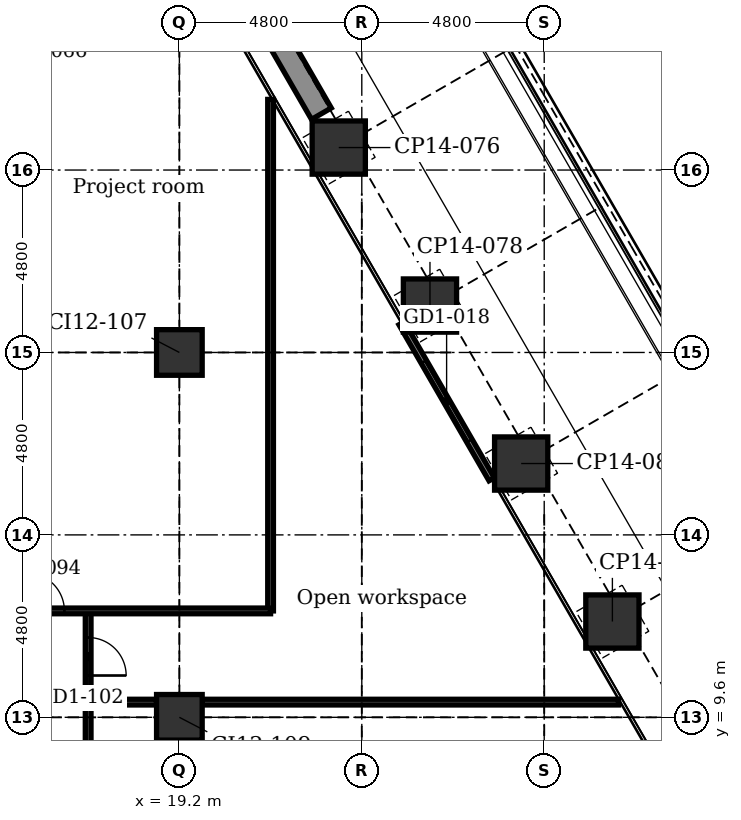
"""IFC4 building model, lengths in metres.
Left out: names, types, materials, properties, quantities, classifications, styles, units other than length and angle.
Written with IfcOpenShell. Run it as: python <this file> out.ifc"""

import sys

from ifc_helpers import new_model, si_unit, direction, frame, frame_2d, origin, origin_2d, place, context, subcontext, project, spatial, rectangle, extrude, element, fill, save


model = new_model("IFC4")
c1 = context("Model", 3, precision=1e-05, world=origin(), true_north=direction((0.0, 1.0)))
c2 = subcontext(c1, "Body", "Model", "MODEL_VIEW")
j1 = project(units=[si_unit("LENGTHUNIT", "METRE"), si_unit("PLANEANGLEUNIT", "RADIAN")], contexts=[c1])
p1 = place(None, origin())
s1 = spatial("IfcSite", under=j1, at=p1, CompositionType="ELEMENT")
p2 = place(p1, origin())
s2 = spatial("IfcBuilding", under=s1, at=p2, CompositionType="ELEMENT")
p3 = place(p2, frame((0.0, 0.0, 38.9)))
s3 = spatial("IfcBuildingStorey", under=s2, at=p3, CompositionType="ELEMENT", Elevation=38.9)
for number, where, z_axis, x_axis in (
    (1, (23.394, 24.592, -0.25), (0.0, 0.0, 1.0), (0.866, 0.5, 0.0)),
    (2, (25.794, 20.435, -0.25), (0.0, 0.0, 1.0), (0.866, 0.5, 0.0)),
    (3, (28.194, 16.278, -0.25), (0.0, 0.0, 1.0), (0.866, 0.5, 0.0)),
    (4, (30.594, 12.121, -0.25), (0.0, 0.0, 1.0), (0.866, 0.5, 0.0)),
):
    element("IfcColumn", number, at=place(p3, frame(where, z_axis=z_axis, x_axis=x_axis)), inside=s3, PredefinedType="COLUMN", context=c2, shape_type="SweptSolid", body=[
        extrude(rectangle(XDim=1.4, YDim=1.4, at=origin_2d()), origin(), (0.0, 0.0, 1.0), 5.5),
    ])
for number, where, z_axis, x_axis in (
    (5, (19.2, 9.6, -0.25), (0.0, 0.0, 1.0), (1.0, 0.0, 0.0)),
    (6, (19.2, 19.2, -0.25), (0.0, 0.0, 1.0), (1.0, 0.0, 0.0)),
):
    element("IfcColumn", number, at=place(p3, frame(where, z_axis=z_axis, x_axis=x_axis)), inside=s3, PredefinedType="COLUMN", context=c2, shape_type="SweptSolid", body=[
        extrude(rectangle(XDim=1.2, YDim=1.2, at=origin_2d()), origin(), (0.0, 0.0, 1.0), 5.5),
    ])
p4 = place(p3, frame((25.047, 19.969, 0.0), z_axis=(0.0, 0.0, 1.0), x_axis=(0.5000167099, -0.866015756104, 0.0)))
e7 = element("IfcWall", 7, at=p4, inside=s3, PredefinedType="PARTITIONING", context=c2, shape_type="SweptSolid", body=[
    extrude(rectangle(XDim=4.74, YDim=0.16, at=frame_2d((2.37, 0.0))), origin(), (0.0, 0.0, 1.0), 5.25),
])
p5 = place(p4, frame((1.17, 0.0, 0.0)))
e8 = element("IfcOpeningElement", 8, at=p5, cuts=e7, PredefinedType="OPENING", context=c2, shape_type="SweptSolid", body=[
    extrude(rectangle(XDim=2.4, YDim=2.4, at=frame_2d((1.2, 1.2))), frame((0.0, 0.09, 0.0), z_axis=(0.0, -1.0, 0.0), x_axis=(1.0, 0.0, 0.0)), (0.0, 0.0, 1.0), 0.18),
])
p6 = place(p3, frame((21.537, 27.907, 0.0), z_axis=(0.0, 0.0, 1.0), x_axis=(0.49998411664, -0.866034573852, 0.0)))
e9 = element("IfcWall", 9, at=p6, inside=s3, PredefinedType="USERDEFINED", context=c2, shape_type="SweptSolid", body=[
    extrude(rectangle(XDim=2.8, YDim=0.6, at=frame_2d((1.4, 0.0))), origin(), (0.0, 0.0, 1.0), 0.7),
])
p7 = place(p3, frame((21.6, 12.4, 0.0), z_axis=(0.0, 0.0, 1.0), x_axis=(0.0, 1.0, 0.0)))
e10 = element("IfcWall", 10, at=p7, inside=s3, PredefinedType="PARTITIONING", context=c2, shape_type="SweptSolid", body=[
    extrude(rectangle(XDim=13.458, YDim=0.15, at=frame_2d((6.729, 0.0))), origin(), (0.0, 0.0, 1.0), 5.25),
])
p8 = place(p3, frame((16.8, 3.95, 0.0), z_axis=(0.0, 0.0, 1.0), x_axis=(0.0, 1.0, 0.0)))
e11 = element("IfcWall", 11, at=p8, inside=s3, PredefinedType="PARTITIONING", context=c2, shape_type="SweptSolid", body=[
    extrude(rectangle(XDim=8.45, YDim=0.15, at=frame_2d((4.225, 0.0))), origin(), (0.0, 0.0, 1.0), 5.25),
])
p9 = place(p8, frame((2.25, 0.0, 0.0)))
e12 = element("IfcOpeningElement", 12, at=p9, cuts=e11, PredefinedType="OPENING", context=c2, shape_type="SweptSolid", body=[
    extrude(rectangle(XDim=1.0, YDim=2.1, at=frame_2d((0.5, 1.05))), frame((0.0, 0.085, 0.0), z_axis=(0.0, -1.0, 0.0), x_axis=(1.0, 0.0, 0.0)), (0.0, 0.0, 1.0), 0.17),
])
p10 = place(p8, frame((6.75, 0.0, 0.0)))
e13 = element("IfcOpeningElement", 13, at=p10, cuts=e11, PredefinedType="OPENING", context=c2, shape_type="SweptSolid", body=[
    extrude(rectangle(XDim=1.0, YDim=2.1, at=frame_2d((0.5, 1.05))), frame((0.0, 0.085, 0.0), z_axis=(0.0, -1.0, 0.0), x_axis=(1.0, 0.0, 0.0)), (0.0, 0.0, 1.0), 0.17),
])
p11 = place(p3, frame((16.8, 10.0, 0.0), z_axis=(0.0, 0.0, 1.0), x_axis=(1.0, 0.0, 0.0)))
e14 = element("IfcWall", 14, at=p11, inside=s3, PredefinedType="PARTITIONING", context=c2, shape_type="SweptSolid", body=[
    extrude(rectangle(XDim=1.8, YDim=0.15, at=frame_2d((0.9, 0.0))), origin(), (0.0, 0.0, 1.0), 5.25),
])
p12 = place(p3, frame((19.8, 10.0, 0.0), z_axis=(0.0, 0.0, 1.0), x_axis=(1.0, 0.0, 0.0)))
e15 = element("IfcWall", 15, at=p12, inside=s3, PredefinedType="PARTITIONING", context=c2, shape_type="SweptSolid", body=[
    extrude(rectangle(XDim=10.956, YDim=0.15, at=frame_2d((5.478, 0.0))), origin(), (0.0, 0.0, 1.0), 5.25),
])
p13 = place(p3, frame((-16.8, 12.4, 0.0), z_axis=(0.0, 0.0, 1.0), x_axis=(1.0, 0.0, 0.0)))
e16 = element("IfcWall", 16, at=p13, inside=s3, PredefinedType="PARTITIONING", context=c2, shape_type="SweptSolid", body=[
    extrude(rectangle(XDim=38.4, YDim=0.15, at=frame_2d((19.2, 0.0))), origin(), (0.0, 0.0, 1.0), 5.25),
])
p14 = place(p13, frame((2.7, 0.0, 0.0)))
e17 = element("IfcOpeningElement", 17, at=p14, cuts=e16, PredefinedType="OPENING", context=c2, shape_type="SweptSolid", body=[
    extrude(rectangle(XDim=1.8, YDim=2.1, at=frame_2d((0.9, 1.05))), frame((0.0, 0.085, 0.0), z_axis=(0.0, -1.0, 0.0), x_axis=(1.0, 0.0, 0.0)), (0.0, 0.0, 1.0), 0.17),
])
p15 = place(p13, frame((9.535, 0.0, 0.0)))
e18 = element("IfcOpeningElement", 18, at=p15, cuts=e16, PredefinedType="OPENING", context=c2, shape_type="SweptSolid", body=[
    extrude(rectangle(XDim=1.0, YDim=2.1, at=frame_2d((0.5, 1.05))), frame((0.0, 0.085, 0.0), z_axis=(0.0, -1.0, 0.0), x_axis=(1.0, 0.0, 0.0)), (0.0, 0.0, 1.0), 0.17),
])
p16 = place(p13, frame((14.335, 0.0, 0.0)))
e19 = element("IfcOpeningElement", 19, at=p16, cuts=e16, PredefinedType="OPENING", context=c2, shape_type="SweptSolid", body=[
    extrude(rectangle(XDim=1.0, YDim=2.1, at=frame_2d((0.5, 1.05))), frame((0.0, 0.085, 0.0), z_axis=(0.0, -1.0, 0.0), x_axis=(1.0, 0.0, 0.0)), (0.0, 0.0, 1.0), 0.17),
])
p17 = place(p13, frame((19.425, 0.0, 0.0)))
e20 = element("IfcOpeningElement", 20, at=p17, cuts=e16, PredefinedType="OPENING", context=c2, shape_type="SweptSolid", body=[
    extrude(rectangle(XDim=1.0, YDim=2.1, at=frame_2d((0.5, 1.05))), frame((0.0, 0.085, 0.0), z_axis=(0.0, -1.0, 0.0), x_axis=(1.0, 0.0, 0.0)), (0.0, 0.0, 1.0), 0.17),
])
p18 = place(p13, frame((23.065, 0.0, 0.0)))
e21 = element("IfcOpeningElement", 21, at=p18, cuts=e16, PredefinedType="OPENING", context=c2, shape_type="SweptSolid", body=[
    extrude(rectangle(XDim=1.0, YDim=2.1, at=frame_2d((0.5, 1.05))), frame((0.0, 0.085, 0.0), z_axis=(0.0, -1.0, 0.0), x_axis=(1.0, 0.0, 0.0)), (0.0, 0.0, 1.0), 0.17),
])
p19 = place(p13, frame((27.865, 0.0, 0.0)))
e22 = element("IfcOpeningElement", 22, at=p19, cuts=e16, PredefinedType="OPENING", context=c2, shape_type="SweptSolid", body=[
    extrude(rectangle(XDim=1.0, YDim=2.1, at=frame_2d((0.5, 1.05))), frame((0.0, 0.085, 0.0), z_axis=(0.0, -1.0, 0.0), x_axis=(1.0, 0.0, 0.0)), (0.0, 0.0, 1.0), 0.17),
])
p20 = place(p13, frame((31.975, 0.0, 0.0)))
e23 = element("IfcOpeningElement", 23, at=p20, cuts=e16, PredefinedType="OPENING", context=c2, shape_type="SweptSolid", body=[
    extrude(rectangle(XDim=1.0, YDim=2.1, at=frame_2d((0.5, 1.05))), frame((0.0, 0.085, 0.0), z_axis=(0.0, -1.0, 0.0), x_axis=(1.0, 0.0, 0.0)), (0.0, 0.0, 1.0), 0.17),
])
p21 = place(p5, origin())
e24 = element("IfcDoor", 24, at=p21, inside=s3, OperationType="DOUBLE_DOOR_SLIDING", PredefinedType="DOOR", context=c2, shape_type="SweptSolid", body=[
    extrude(rectangle(XDim=2.4, YDim=2.4, at=frame_2d((1.2, 1.2))), frame((0.0, 0.025, 0.0), z_axis=(0.0, -1.0, 0.0), x_axis=(1.0, 0.0, 0.0)), (0.0, 0.0, 1.0), 0.05),
])
fill(e8, e24)
p22 = place(p20, origin())
e25 = element("IfcDoor", 25, at=p22, inside=s3, OperationType="SINGLE_SWING_LEFT", PredefinedType="DOOR", context=c2, shape_type="SweptSolid", body=[
    extrude(rectangle(XDim=1.0, YDim=2.1, at=frame_2d((0.5, 1.05))), frame((0.0, 0.025, 0.0), z_axis=(0.0, -1.0, 0.0), x_axis=(1.0, 0.0, 0.0)), (0.0, 0.0, 1.0), 0.05),
])
fill(e23, e25)
p23 = place(p10, frame((1.0, 0.0, 0.0), z_axis=(0.0, 0.0, 1.0), x_axis=(-1.0, 0.0, 0.0)))
e26 = element("IfcDoor", 26, at=p23, inside=s3, OperationType="SINGLE_SWING_LEFT", PredefinedType="DOOR", context=c2, shape_type="SweptSolid", body=[
    extrude(rectangle(XDim=1.0, YDim=2.1, at=frame_2d((0.5, 1.05))), frame((0.0, 0.025, 0.0), z_axis=(0.0, -1.0, 0.0), x_axis=(1.0, 0.0, 0.0)), (0.0, 0.0, 1.0), 0.05),
])
fill(e13, e26)
save(model, sys.argv[1])
